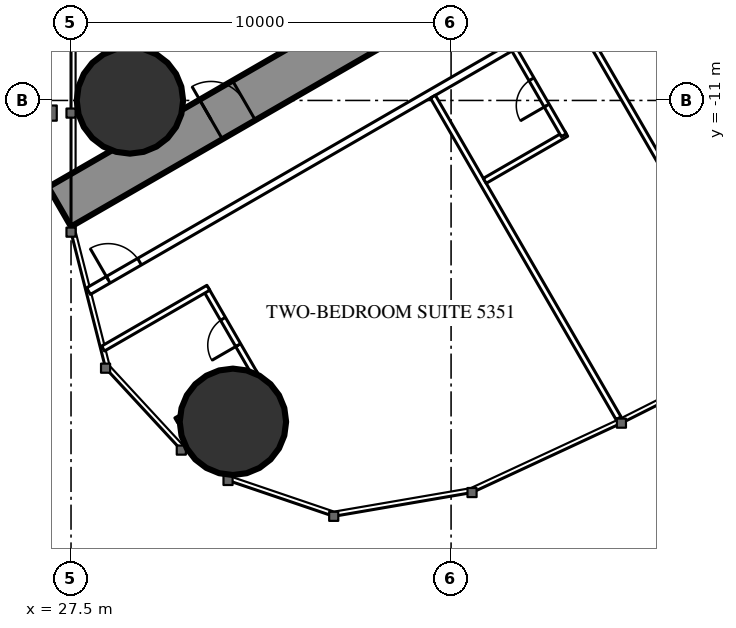
"""IFC4 building model, lengths in metres.
Left out: names, types, materials, properties, quantities, classifications, styles, units other than length and angle.
Written with IfcOpenShell. Run it as: python <this file> out.ifc"""

import sys

from ifc_helpers import new_model, si_unit, direction, frame, frame_2d, origin, origin_2d, place, context, subcontext, project, spatial, rectangle, circle, extrude, element, fill, save


model = new_model("IFC4")
c1 = context("Model", 3, precision=1e-05, world=origin(), true_north=direction((0.0, 1.0)))
c2 = subcontext(c1, "Body", "Model", "MODEL_VIEW")
j1 = project(units=[si_unit("LENGTHUNIT", "METRE"), si_unit("PLANEANGLEUNIT", "RADIAN")], contexts=[c1])
p1 = place(None, origin())
s1 = spatial("IfcSite", under=j1, at=p1, CompositionType="ELEMENT")
p2 = place(p1, origin())
s2 = spatial("IfcBuilding", under=s1, at=p2, CompositionType="ELEMENT")
p3 = place(p2, frame((0.0, 0.0, 198.3)))
s3 = spatial("IfcBuildingStorey", under=s2, at=p3, CompositionType="ELEMENT", Elevation=198.3)
for number, where, z_axis, x_axis in (
    (1, (31.76, -19.456, 0.0), (0.0, 0.0, 1.0), (1.0, 0.0, 0.0)),
    (2, (29.05, -11.0, 0.0), (0.0, 0.0, 1.0), (1.0, 0.0, 0.0)),
):
    element("IfcColumn", number, at=place(p3, frame(where, z_axis=z_axis, x_axis=x_axis)), inside=s3, PredefinedType="COLUMN", context=c2, shape_type="SweptSolid", body=[
        extrude(circle(Radius=1.4, at=origin_2d()), origin(), (0.0, 0.0, 1.0), 3.5),
    ])
p4 = place(p3, frame((27.2, -13.8, 0.0), z_axis=(0.0, 0.0, 1.0), x_axis=(0.866027159892, 0.499996958321, 0.0)))
e3 = element("IfcWall", 3, at=p4, inside=s3, PredefinedType="SHEAR", context=c2, shape_type="SweptSolid", body=[
    extrude(rectangle(XDim=27.947, YDim=1.2, at=frame_2d((13.973, 0.0))), origin(), (0.0, 0.0, 1.0), 3.5),
])
p5 = place(p4, frame((4.6, 0.0, 0.0)))
e4 = element("IfcOpeningElement", 4, at=p5, cuts=e3, PredefinedType="OPENING", context=c2, shape_type="SweptSolid", body=[
    extrude(rectangle(XDim=1.0, YDim=2.2, at=frame_2d((0.5, 1.1))), frame((0.0, 0.61, 0.0), z_axis=(0.0, -1.0, 0.0), x_axis=(1.0, 0.0, 0.0)), (0.0, 0.0, 1.0), 1.22),
])
p6 = place(p4, frame((13.395, 0.0, 0.0)))
e5 = element("IfcOpeningElement", 5, at=p6, cuts=e3, PredefinedType="OPENING", context=c2, shape_type="SweptSolid", body=[
    extrude(rectangle(XDim=1.8, YDim=2.2, at=frame_2d((0.9, 1.1))), frame((0.0, 0.61, 0.0), z_axis=(0.0, -1.0, 0.0), x_axis=(1.0, 0.0, 0.0)), (0.0, 0.0, 1.0), 1.22),
])
p7 = place(p3, frame((27.959, -16.017, 0.0), z_axis=(0.0, 0.0, 1.0), x_axis=(0.866024151371, 0.500002169237, 0.0)))
e6 = element("IfcWall", 6, at=p7, inside=s3, PredefinedType="PARTITIONING", context=c2, shape_type="SweptSolid", body=[
    extrude(rectangle(XDim=32.034, YDim=0.2, at=frame_2d((16.017, 0.0))), origin(), (0.0, 0.0, 1.0), 3.25),
])
p8 = place(p7, frame((0.6, 0.0, 0.0)))
e7 = element("IfcOpeningElement", 7, at=p8, cuts=e6, PredefinedType="OPENING", context=c2, shape_type="SweptSolid", body=[
    extrude(rectangle(XDim=0.95, YDim=2.2, at=frame_2d((0.475, 1.1))), frame((0.0, 0.11, 0.0), z_axis=(0.0, -1.0, 0.0), x_axis=(1.0, 0.0, 0.0)), (0.0, 0.0, 1.0), 0.22),
])
p9 = place(p7, frame((13.132, 0.0, 0.0)))
e8 = element("IfcOpeningElement", 8, at=p9, cuts=e6, PredefinedType="OPENING", context=c2, shape_type="SweptSolid", body=[
    extrude(rectangle(XDim=0.95, YDim=2.2, at=frame_2d((0.475, 1.1))), frame((0.0, 0.11, 0.0), z_axis=(0.0, -1.0, 0.0), x_axis=(1.0, 0.0, 0.0)), (0.0, 0.0, 1.0), 0.22),
])
p10 = place(p7, frame((15.391, 0.0, 0.0)))
e9 = element("IfcOpeningElement", 9, at=p10, cuts=e6, PredefinedType="OPENING", context=c2, shape_type="SweptSolid", body=[
    extrude(rectangle(XDim=0.95, YDim=2.2, at=frame_2d((0.475, 1.1))), frame((0.0, 0.11, 0.0), z_axis=(0.0, -1.0, 0.0), x_axis=(1.0, 0.0, 0.0)), (0.0, 0.0, 1.0), 0.22),
])
p11 = place(p7, frame((19.441, 0.0, 0.0)))
e10 = element("IfcOpeningElement", 10, at=p11, cuts=e6, PredefinedType="OPENING", context=c2, shape_type="SweptSolid", body=[
    extrude(rectangle(XDim=0.95, YDim=2.2, at=frame_2d((0.475, 1.1))), frame((0.0, 0.11, 0.0), z_axis=(0.0, -1.0, 0.0), x_axis=(1.0, 0.0, 0.0)), (0.0, 0.0, 1.0), 0.22),
])
p12 = place(p7, frame((26.406, 0.0, 0.0)))
e11 = element("IfcOpeningElement", 11, at=p12, cuts=e6, PredefinedType="OPENING", context=c2, shape_type="SweptSolid", body=[
    extrude(rectangle(XDim=0.95, YDim=2.2, at=frame_2d((0.475, 1.1))), frame((0.0, 0.11, 0.0), z_axis=(0.0, -1.0, 0.0), x_axis=(1.0, 0.0, 0.0)), (0.0, 0.0, 1.0), 0.22),
])
p13 = place(p7, frame((28.87, 0.0, 0.0)))
e12 = element("IfcOpeningElement", 12, at=p13, cuts=e6, PredefinedType="OPENING", context=c2, shape_type="SweptSolid", body=[
    extrude(rectangle(XDim=1.8, YDim=2.2, at=frame_2d((0.9, 1.1))), frame((0.0, 0.11, 0.0), z_axis=(0.0, -1.0, 0.0), x_axis=(1.0, 0.0, 0.0)), (0.0, 0.0, 1.0), 0.22),
])
p14 = place(p3, frame((37.022, -10.9, 0.0), z_axis=(0.0, 0.0, 1.0), x_axis=(0.499998620953, -0.866026199976, 0.0)))
e13 = element("IfcWall", 13, at=p14, inside=s3, PredefinedType="PARTITIONING", context=c2, shape_type="SweptSolid", body=[
    extrude(rectangle(XDim=9.77, YDim=0.15, at=frame_2d((4.885, 0.0))), origin(), (0.0, 0.0, 1.0), 3.25),
])
p15 = place(p3, frame((40.769, -8.737, 0.0), z_axis=(0.0, 0.0, 1.0), x_axis=(0.500013115284, -0.866017831539, 0.0)))
e14 = element("IfcWall", 14, at=p15, inside=s3, PredefinedType="PARTITIONING", context=c2, shape_type="SweptSolid", body=[
    extrude(rectangle(XDim=7.198, YDim=0.15, at=frame_2d((3.599, 0.0))), origin(), (0.0, 0.0, 1.0), 2.3),
])
p16 = place(p3, frame((30.269, -19.418, 0.0), z_axis=(0.0, 0.0, 1.0), x_axis=(0.866006523861, 0.500032699561, 0.0)))
e15 = element("IfcWall", 15, at=p16, inside=s3, PredefinedType="PARTITIONING", context=c2, shape_type="SweptSolid", body=[
    extrude(rectangle(XDim=2.475, YDim=0.15, at=frame_2d((1.237, 0.0))), origin(), (0.0, 0.0, 1.0), 3.25),
])
p17 = place(p3, frame((31.048, -15.966, 0.0), z_axis=(0.0, 0.0, 1.0), x_axis=(0.499936506574, -0.866062058628, 0.0)))
e16 = element("IfcWall", 16, at=p17, inside=s3, PredefinedType="PARTITIONING", context=c2, shape_type="SweptSolid", body=[
    extrude(rectangle(XDim=2.6, YDim=0.15, at=frame_2d((1.3, 0.0))), origin(), (0.0, 0.0, 1.0), 3.25),
])
p18 = place(p17, frame((0.9, 0.0, 0.0)))
e17 = element("IfcOpeningElement", 17, at=p18, cuts=e16, PredefinedType="OPENING", context=c2, shape_type="SweptSolid", body=[
    extrude(rectangle(XDim=0.8, YDim=2.2, at=frame_2d((0.4, 1.1))), frame((0.0, 0.085, 0.0), z_axis=(0.0, -1.0, 0.0), x_axis=(1.0, 0.0, 0.0)), (0.0, 0.0, 1.0), 0.17),
])
p19 = place(p3, frame((28.343, -17.528, 0.0), z_axis=(0.0, 0.0, 1.0), x_axis=(0.86600760081, 0.500030834389, 0.0)))
e18 = element("IfcWall", 18, at=p19, inside=s3, PredefinedType="PARTITIONING", context=c2, shape_type="SweptSolid", body=[
    extrude(rectangle(XDim=3.198, YDim=0.15, at=frame_2d((1.599, 0.0))), origin(), (0.0, 0.0, 1.0), 3.25),
])
p20 = place(p3, frame((38.387, -13.115, 0.0), z_axis=(0.0, 0.0, 1.0), x_axis=(0.866073894602, 0.499916002032, 0.0)))
e19 = element("IfcWall", 19, at=p20, inside=s3, PredefinedType="PARTITIONING", context=c2, shape_type="SweptSolid", body=[
    extrude(rectangle(XDim=2.475, YDim=0.15, at=frame_2d((1.238, 0.0))), origin(), (0.0, 0.0, 1.0), 3.25),
])
p21 = place(p3, frame((39.166, -9.663, 0.0), z_axis=(0.0, 0.0, 1.0), x_axis=(0.500006934395, -0.866021400173, 0.0)))
e20 = element("IfcWall", 20, at=p21, inside=s3, PredefinedType="PARTITIONING", context=c2, shape_type="SweptSolid", body=[
    extrude(rectangle(XDim=2.6, YDim=0.15, at=frame_2d((1.3, 0.0))), origin(), (0.0, 0.0, 1.0), 3.25),
])
p22 = place(p21, frame((0.9, 0.0, 0.0)))
e21 = element("IfcOpeningElement", 21, at=p22, cuts=e20, PredefinedType="OPENING", context=c2, shape_type="SweptSolid", body=[
    extrude(rectangle(XDim=0.8, YDim=2.2, at=frame_2d((0.4, 1.1))), frame((0.0, 0.085, 0.0), z_axis=(0.0, -1.0, 0.0), x_axis=(1.0, 0.0, 0.0)), (0.0, 0.0, 1.0), 0.17),
])
p23 = place(p3, frame((42.378, -7.808, 0.0), z_axis=(0.0, 0.0, 1.0), x_axis=(0.500006934395, -0.866021400173, 0.0)))
e22 = element("IfcWall", 22, at=p23, inside=s3, PredefinedType="PARTITIONING", context=c2, shape_type="SweptSolid", body=[
    extrude(rectangle(XDim=2.6, YDim=0.15, at=frame_2d((1.3, 0.0))), origin(), (0.0, 0.0, 1.0), 3.25),
])
p24 = place(p23, frame((0.9, 0.0, 0.0)))
e23 = element("IfcOpeningElement", 23, at=p24, cuts=e22, PredefinedType="OPENING", context=c2, shape_type="SweptSolid", body=[
    extrude(rectangle(XDim=0.8, YDim=2.2, at=frame_2d((0.4, 1.1))), frame((0.0, 0.085, 0.0), z_axis=(0.0, -1.0, 0.0), x_axis=(1.0, 0.0, 0.0)), (0.0, 0.0, 1.0), 0.17),
])
p25 = place(p18, origin())
e24 = element("IfcDoor", 24, at=p25, inside=s3, OperationType="SINGLE_SWING_RIGHT", PredefinedType="DOOR", context=c2, shape_type="SweptSolid", body=[
    extrude(rectangle(XDim=0.8, YDim=2.2, at=frame_2d((0.4, 1.1))), frame((0.0, 0.025, 0.0), z_axis=(0.0, -1.0, 0.0), x_axis=(1.0, 0.0, 0.0)), (0.0, 0.0, 1.0), 0.05),
])
fill(e17, e24)
p26 = place(p8, origin())
e25 = element("IfcDoor", 25, at=p26, inside=s3, OperationType="SINGLE_SWING_LEFT", PredefinedType="DOOR", context=c2, shape_type="SweptSolid", body=[
    extrude(rectangle(XDim=0.95, YDim=2.2, at=frame_2d((0.475, 1.1))), frame((0.0, 0.025, 0.0), z_axis=(0.0, -1.0, 0.0), x_axis=(1.0, 0.0, 0.0)), (0.0, 0.0, 1.0), 0.05),
])
fill(e7, e25)
p27 = place(p22, origin())
e26 = element("IfcDoor", 26, at=p27, inside=s3, OperationType="SINGLE_SWING_RIGHT", PredefinedType="DOOR", context=c2, shape_type="SweptSolid", body=[
    extrude(rectangle(XDim=0.8, YDim=2.2, at=frame_2d((0.4, 1.1))), frame((0.0, 0.025, 0.0), z_axis=(0.0, -1.0, 0.0), x_axis=(1.0, 0.0, 0.0)), (0.0, 0.0, 1.0), 0.05),
])
fill(e21, e26)
p28 = place(p5, origin())
e27 = element("IfcDoor", 27, at=p28, inside=s3, OperationType="SINGLE_SWING_LEFT", PredefinedType="DOOR", context=c2, shape_type="SweptSolid", body=[
    extrude(rectangle(XDim=1.0, YDim=2.2, at=frame_2d((0.5, 1.1))), frame((0.0, 0.025, 0.0), z_axis=(0.0, -1.0, 0.0), x_axis=(1.0, 0.0, 0.0)), (0.0, 0.0, 1.0), 0.05),
])
fill(e4, e27)
save(model, sys.argv[1])
